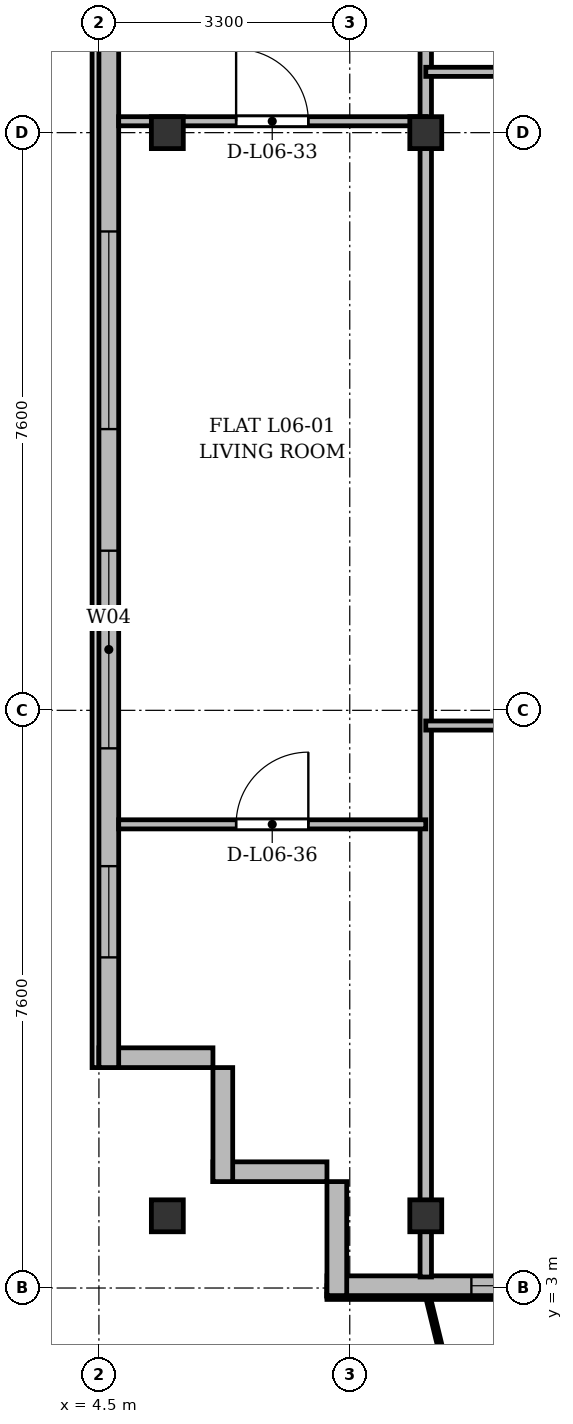
"""IFC4 building model, lengths in metres.
Left out: names, types, materials, properties, quantities, classifications, styles, units other than length and angle.
Written with IfcOpenShell. Run it as: python <this file> out.ifc"""

import sys

from ifc_helpers import new_model, si_unit, direction, frame, frame_2d, origin, origin_2d, place, context, subcontext, project, spatial, rectangle, i_section, extrude, source, transform, mapped, element, fill, save


model = new_model("IFC4")
c1 = context("Model", 3, precision=1e-05, world=origin(), true_north=direction((0.0, 1.0)))
c2 = subcontext(c1, "Body", "Model", "MODEL_VIEW")
j1 = project(units=[si_unit("LENGTHUNIT", "METRE"), si_unit("PLANEANGLEUNIT", "RADIAN")], contexts=[c1])
p1 = place(None, origin())
s1 = spatial("IfcSite", under=j1, at=p1, CompositionType="ELEMENT")
p2 = place(p1, origin())
s2 = spatial("IfcBuilding", under=s1, at=p2, CompositionType="ELEMENT")
p3 = place(p2, frame((0.0, 0.0, 27.1)))
s3 = spatial("IfcBuildingStorey", under=s2, at=p3, CompositionType="ELEMENT", Elevation=27.1)
m1 = source(origin(), c2, "Body", "SweptSolid", [
    extrude(i_section(OverallWidth=0.42, OverallDepth=0.42, WebThickness=0.026, FlangeThickness=0.04, at=origin_2d()), origin(), (0.0, 0.0, 1.0), 3.6),
])
for number, where, z_axis, x_axis in (
    (1, (5.4, 3.95, 0.0), (0.0, 0.0, 1.0), (1.0, 0.0, 0.0)),
    (2, (5.4, 18.2, 0.0), (0.0, 0.0, 1.0), (1.0, 0.0, 0.0)),
    (3, (8.8, 3.95, 0.0), (0.0, 0.0, 1.0), (1.0, 0.0, 0.0)),
    (4, (8.8, 18.2, 0.0), (0.0, 0.0, 1.0), (1.0, 0.0, 0.0)),
):
    element("IfcColumn", number, at=place(p3, frame(where, z_axis=z_axis, x_axis=x_axis)), inside=s3, PredefinedType="COLUMN", context=c2, shape_type="MappedRepresentation", body=[
        mapped(m1, transform((0.0, 0.0, 0.0), x_axis=(1.0, 0.0, 0.0), y_axis=(0.0, 1.0, 0.0), z_axis=(0.0, 0.0, 1.0), scale=1.0)),
    ])
for number, where, z_axis, x_axis in (
    (5, (7.5, 4.53, 0.0), (0.0, 0.0, 1.0), (-1.0, 0.0, 0.0)),
    (6, (6.13, 4.4, 0.0), (0.0, 0.0, 1.0), (0.0, 1.0, 0.0)),
):
    element("IfcWall", number, at=place(p3, frame(where, z_axis=z_axis, x_axis=x_axis)), inside=s3, PredefinedType="SOLIDWALL", context=c2, shape_type="SweptSolid", body=[
        extrude(rectangle(XDim=1.5, YDim=0.26, at=frame_2d((0.75, 0.0))), origin(), (0.0, 0.0, 1.0), 3.34),
    ])
p4 = place(p3, frame((6.0, 6.03, 0.0), z_axis=(0.0, 0.0, 1.0), x_axis=(-1.0, 0.0, 0.0)))
e7 = element("IfcWall", 7, at=p4, inside=s3, PredefinedType="SOLIDWALL", context=c2, shape_type="SweptSolid", body=[
    extrude(rectangle(XDim=1.5, YDim=0.26, at=frame_2d((0.75, 0.0))), origin(), (0.0, 0.0, 1.0), 2.752),
])
p5 = place(p3, frame((4.63, 5.9, 0.0), z_axis=(0.0, 0.0, 1.0), x_axis=(0.0, 1.0, 0.0)))
e8 = element("IfcWall", 8, at=p5, inside=s3, PredefinedType="SOLIDWALL", context=c2, shape_type="SweptSolid", body=[
    extrude(rectangle(XDim=39.6, YDim=0.26, at=frame_2d((19.8, 0.0))), origin(), (0.0, 0.0, 1.0), 3.34),
])
p6 = place(p5, frame((1.45, 0.0, 0.92)))
e9 = element("IfcOpeningElement", 9, at=p6, cuts=e8, PredefinedType="OPENING", context=c2, shape_type="SweptSolid", body=[
    extrude(rectangle(XDim=1.2, YDim=1.65, at=frame_2d((0.6, 0.825))), frame((0.0, 0.14, 0.0), z_axis=(0.0, -1.0, 0.0), x_axis=(1.0, 0.0, 0.0)), (0.0, 0.0, 1.0), 0.28),
])
p7 = place(p5, frame((4.2, 0.0, 0.92)))
e10 = element("IfcOpeningElement", 10, at=p7, cuts=e8, PredefinedType="OPENING", context=c2, shape_type="SweptSolid", body=[
    extrude(rectangle(XDim=2.6, YDim=1.9, at=frame_2d((1.3, 0.95))), frame((0.0, 0.14, 0.0), z_axis=(0.0, -1.0, 0.0), x_axis=(1.0, 0.0, 0.0)), (0.0, 0.0, 1.0), 0.28),
])
p8 = place(p5, frame((8.4, 0.0, 0.92)))
e11 = element("IfcOpeningElement", 11, at=p8, cuts=e8, PredefinedType="OPENING", context=c2, shape_type="SweptSolid", body=[
    extrude(rectangle(XDim=2.6, YDim=1.9, at=frame_2d((1.3, 0.95))), frame((0.0, 0.14, 0.0), z_axis=(0.0, -1.0, 0.0), x_axis=(1.0, 0.0, 0.0)), (0.0, 0.0, 1.0), 0.28),
])
p9 = place(p5, frame((33.9, 0.0, 0.92)))
e12 = element("IfcOpeningElement", 12, at=p9, cuts=e8, PredefinedType="OPENING", context=c2, shape_type="SweptSolid", body=[
    extrude(rectangle(XDim=1.2, YDim=1.65, at=frame_2d((0.6, 0.825))), frame((0.0, 0.14, 0.0), z_axis=(0.0, -1.0, 0.0), x_axis=(1.0, 0.0, 0.0)), (0.0, 0.0, 1.0), 0.28),
])
p10 = place(p5, frame((37.25, 0.0, 0.92)))
e13 = element("IfcOpeningElement", 13, at=p10, cuts=e8, PredefinedType="OPENING", context=c2, shape_type="SweptSolid", body=[
    extrude(rectangle(XDim=1.2, YDim=1.65, at=frame_2d((0.6, 0.825))), frame((0.0, 0.14, 0.0), z_axis=(0.0, -1.0, 0.0), x_axis=(1.0, 0.0, 0.0)), (0.0, 0.0, 1.0), 0.28),
])
p11 = place(p3, frame((66.9, 3.03, 0.0), z_axis=(0.0, 0.0, 1.0), x_axis=(-1.0, 0.0, 0.0)))
e14 = element("IfcWall", 14, at=p11, inside=s3, PredefinedType="SOLIDWALL", context=c2, shape_type="SweptSolid", body=[
    extrude(rectangle(XDim=59.4, YDim=0.26, at=frame_2d((29.7, 0.0))), origin(), (0.0, 0.0, 1.0), 3.34),
])
p12 = place(p11, frame((3.95, 0.0, 0.9)))
e15 = element("IfcOpeningElement", 15, at=p12, cuts=e14, PredefinedType="OPENING", context=c2, shape_type="SweptSolid", body=[
    extrude(rectangle(XDim=1.5, YDim=1.75, at=frame_2d((0.75, 0.875))), frame((0.0, 0.14, 0.0), z_axis=(0.0, -1.0, 0.0), x_axis=(1.0, 0.0, 0.0)), (0.0, 0.0, 1.0), 0.28),
])
p13 = place(p11, frame((9.05, 0.0, 0.9)))
e16 = element("IfcOpeningElement", 16, at=p13, cuts=e14, PredefinedType="OPENING", context=c2, shape_type="SweptSolid", body=[
    extrude(rectangle(XDim=2.0, YDim=1.95, at=frame_2d((1.0, 0.975))), frame((0.0, 0.14, 0.0), z_axis=(0.0, -1.0, 0.0), x_axis=(1.0, 0.0, 0.0)), (0.0, 0.0, 1.0), 0.28),
])
p14 = place(p11, frame((13.125, 0.0, 0.9)))
e17 = element("IfcOpeningElement", 17, at=p14, cuts=e14, PredefinedType="OPENING", context=c2, shape_type="SweptSolid", body=[
    extrude(rectangle(XDim=1.65, YDim=1.85, at=frame_2d((0.825, 0.925))), frame((0.0, 0.14, 0.0), z_axis=(0.0, -1.0, 0.0), x_axis=(1.0, 0.0, 0.0)), (0.0, 0.0, 1.0), 0.28),
])
p15 = place(p11, frame((17.007, 0.0, 0.0)))
e18 = element("IfcOpeningElement", 18, at=p15, cuts=e14, PredefinedType="OPENING", context=c2, shape_type="SweptSolid", body=[
    extrude(rectangle(XDim=1.2, YDim=2.2, at=frame_2d((0.6, 1.1))), frame((0.0, 0.14, 0.0), z_axis=(0.0, -1.0, 0.0), x_axis=(1.0, 0.0, 0.0)), (0.0, 0.0, 1.0), 0.28),
])
p16 = place(p11, frame((20.2, 0.0, 0.9)))
e19 = element("IfcOpeningElement", 19, at=p16, cuts=e14, PredefinedType="OPENING", context=c2, shape_type="SweptSolid", body=[
    extrude(rectangle(XDim=2.2, YDim=1.8, at=frame_2d((1.1, 0.9))), frame((0.0, 0.14, 0.0), z_axis=(0.0, -1.0, 0.0), x_axis=(1.0, 0.0, 0.0)), (0.0, 0.0, 1.0), 0.28),
])
p17 = place(p11, frame((24.0, 0.0, 0.9)))
e20 = element("IfcOpeningElement", 20, at=p17, cuts=e14, PredefinedType="OPENING", context=c2, shape_type="SweptSolid", body=[
    extrude(rectangle(XDim=1.5, YDim=1.75, at=frame_2d((0.75, 0.875))), frame((0.0, 0.14, 0.0), z_axis=(0.0, -1.0, 0.0), x_axis=(1.0, 0.0, 0.0)), (0.0, 0.0, 1.0), 0.28),
])
p18 = place(p11, frame((27.05, 0.0, 0.9)))
e21 = element("IfcOpeningElement", 21, at=p18, cuts=e14, PredefinedType="OPENING", context=c2, shape_type="SweptSolid", body=[
    extrude(rectangle(XDim=2.0, YDim=1.95, at=frame_2d((1.0, 0.975))), frame((0.0, 0.14, 0.0), z_axis=(0.0, -1.0, 0.0), x_axis=(1.0, 0.0, 0.0)), (0.0, 0.0, 1.0), 0.28),
])
p19 = place(p11, frame((32.175, 0.0, 0.9)))
e22 = element("IfcOpeningElement", 22, at=p19, cuts=e14, PredefinedType="OPENING", context=c2, shape_type="SweptSolid", body=[
    extrude(rectangle(XDim=1.65, YDim=1.85, at=frame_2d((0.825, 0.925))), frame((0.0, 0.14, 0.0), z_axis=(0.0, -1.0, 0.0), x_axis=(1.0, 0.0, 0.0)), (0.0, 0.0, 1.0), 0.28),
])
p20 = place(p11, frame((36.6, 0.0, 0.9)))
e23 = element("IfcOpeningElement", 23, at=p20, cuts=e14, PredefinedType="OPENING", context=c2, shape_type="SweptSolid", body=[
    extrude(rectangle(XDim=1.8, YDim=1.8, at=frame_2d((0.9, 0.9))), frame((0.0, 0.14, 0.0), z_axis=(0.0, -1.0, 0.0), x_axis=(1.0, 0.0, 0.0)), (0.0, 0.0, 1.0), 0.28),
])
p21 = place(p11, frame((39.15, 0.0, 0.9)))
e24 = element("IfcOpeningElement", 24, at=p21, cuts=e14, PredefinedType="OPENING", context=c2, shape_type="SweptSolid", body=[
    extrude(rectangle(XDim=1.5, YDim=1.75, at=frame_2d((0.75, 0.875))), frame((0.0, 0.14, 0.0), z_axis=(0.0, -1.0, 0.0), x_axis=(1.0, 0.0, 0.0)), (0.0, 0.0, 1.0), 0.28),
])
p22 = place(p11, frame((41.55, 0.0, 0.9)))
e25 = element("IfcOpeningElement", 25, at=p22, cuts=e14, PredefinedType="OPENING", context=c2, shape_type="SweptSolid", body=[
    extrude(rectangle(XDim=1.5, YDim=1.75, at=frame_2d((0.75, 0.875))), frame((0.0, 0.14, 0.0), z_axis=(0.0, -1.0, 0.0), x_axis=(1.0, 0.0, 0.0)), (0.0, 0.0, 1.0), 0.28),
])
p23 = place(p11, frame((45.435, 0.0, 0.0)))
e26 = element("IfcOpeningElement", 26, at=p23, cuts=e14, PredefinedType="OPENING", context=c2, shape_type="SweptSolid", body=[
    extrude(rectangle(XDim=1.2, YDim=2.2, at=frame_2d((0.6, 1.1))), frame((0.0, 0.14, 0.0), z_axis=(0.0, -1.0, 0.0), x_axis=(1.0, 0.0, 0.0)), (0.0, 0.0, 1.0), 0.28),
])
p24 = place(p11, frame((48.525, 0.0, 0.9)))
e27 = element("IfcOpeningElement", 27, at=p24, cuts=e14, PredefinedType="OPENING", context=c2, shape_type="SweptSolid", body=[
    extrude(rectangle(XDim=1.65, YDim=1.85, at=frame_2d((0.825, 0.925))), frame((0.0, 0.14, 0.0), z_axis=(0.0, -1.0, 0.0), x_axis=(1.0, 0.0, 0.0)), (0.0, 0.0, 1.0), 0.28),
])
p25 = place(p11, frame((52.1, 0.0, 0.9)))
e28 = element("IfcOpeningElement", 28, at=p25, cuts=e14, PredefinedType="OPENING", context=c2, shape_type="SweptSolid", body=[
    extrude(rectangle(XDim=1.8, YDim=1.8, at=frame_2d((0.9, 0.9))), frame((0.0, 0.14, 0.0), z_axis=(0.0, -1.0, 0.0), x_axis=(1.0, 0.0, 0.0)), (0.0, 0.0, 1.0), 0.28),
])
p26 = place(p11, frame((55.3, 0.0, 0.9)))
e29 = element("IfcOpeningElement", 29, at=p26, cuts=e14, PredefinedType="OPENING", context=c2, shape_type="SweptSolid", body=[
    extrude(rectangle(XDim=2.2, YDim=1.8, at=frame_2d((1.1, 0.9))), frame((0.0, 0.14, 0.0), z_axis=(0.0, -1.0, 0.0), x_axis=(1.0, 0.0, 0.0)), (0.0, 0.0, 1.0), 0.28),
])
p27 = place(p3, frame((7.63, 2.9, 0.0), z_axis=(0.0, 0.0, 1.0), x_axis=(0.0, 1.0, 0.0)))
e30 = element("IfcWall", 30, at=p27, inside=s3, PredefinedType="SOLIDWALL", context=c2, shape_type="SweptSolid", body=[
    extrude(rectangle(XDim=1.5, YDim=0.26, at=frame_2d((0.75, 0.0))), origin(), (0.0, 0.0, 1.0), 2.69),
])
p28 = place(p3, frame((8.8, 3.145, 0.0), z_axis=(0.0, 0.0, 1.0), x_axis=(0.0, 1.0, 0.0)))
e31 = element("IfcWall", 31, at=p28, inside=s3, PredefinedType="PARTITIONING", context=c2, shape_type="SweptSolid", body=[
    extrude(rectangle(XDim=24.455, YDim=0.15, at=frame_2d((12.228, 0.0))), origin(), (0.0, 0.0, 1.0), 2.752),
])
p29 = place(p3, frame((4.76, 18.35, 0.0), z_axis=(0.0, 0.0, 1.0), x_axis=(1.0, 0.0, 0.0)))
e32 = element("IfcWall", 32, at=p29, inside=s3, PredefinedType="PARTITIONING", context=c2, shape_type="SweptSolid", body=[
    extrude(rectangle(XDim=4.04, YDim=0.12, at=frame_2d((2.02, 0.0))), origin(), (0.0, 0.0, 1.0), 2.69),
])
p30 = place(p29, frame((1.545, 0.0, 0.0)))
e33 = element("IfcOpeningElement", 33, at=p30, cuts=e32, PredefinedType="OPENING", context=c2, shape_type="SweptSolid", body=[
    extrude(rectangle(XDim=0.95, YDim=2.15, at=frame_2d((0.475, 1.075))), frame((0.0, 0.07, 0.0), z_axis=(0.0, -1.0, 0.0), x_axis=(1.0, 0.0, 0.0)), (0.0, 0.0, 1.0), 0.14),
])
p31 = place(p3, frame((4.76, 9.1, 0.0), z_axis=(0.0, 0.0, 1.0), x_axis=(1.0, 0.0, 0.0)))
e34 = element("IfcWall", 34, at=p31, inside=s3, PredefinedType="PARTITIONING", context=c2, shape_type="SweptSolid", body=[
    extrude(rectangle(XDim=4.04, YDim=0.12, at=frame_2d((2.02, 0.0))), origin(), (0.0, 0.0, 1.0), 2.752),
])
p32 = place(p31, frame((1.545, 0.0, 0.0)))
e35 = element("IfcOpeningElement", 35, at=p32, cuts=e34, PredefinedType="OPENING", context=c2, shape_type="SweptSolid", body=[
    extrude(rectangle(XDim=0.95, YDim=2.15, at=frame_2d((0.475, 1.075))), frame((0.0, 0.07, 0.0), z_axis=(0.0, -1.0, 0.0), x_axis=(1.0, 0.0, 0.0)), (0.0, 0.0, 1.0), 0.14),
])
p33 = place(p3, frame((8.8, 19.0, 0.0), z_axis=(0.0, 0.0, 1.0), x_axis=(1.0, 0.0, 0.0)))
e36 = element("IfcWall", 36, at=p33, inside=s3, PredefinedType="PARTITIONING", context=c2, shape_type="SweptSolid", body=[
    extrude(rectangle(XDim=6.8, YDim=0.12, at=frame_2d((3.4, 0.0))), origin(), (0.0, 0.0, 1.0), 2.752),
])
p34 = place(p33, frame((2.925, 0.0, 0.0)))
e37 = element("IfcOpeningElement", 37, at=p34, cuts=e36, PredefinedType="OPENING", context=c2, shape_type="SweptSolid", body=[
    extrude(rectangle(XDim=0.95, YDim=2.15, at=frame_2d((0.475, 1.075))), frame((0.0, 0.07, 0.0), z_axis=(0.0, -1.0, 0.0), x_axis=(1.0, 0.0, 0.0)), (0.0, 0.0, 1.0), 0.14),
])
p35 = place(p3, frame((8.8, 10.4, 0.0), z_axis=(0.0, 0.0, 1.0), x_axis=(1.0, 0.0, 0.0)))
e38 = element("IfcWall", 38, at=p35, inside=s3, PredefinedType="PARTITIONING", context=c2, shape_type="SweptSolid", body=[
    extrude(rectangle(XDim=3.4, YDim=0.12, at=frame_2d((1.7, 0.0))), origin(), (0.0, 0.0, 1.0), 2.752),
])
p36 = place(p35, frame((1.131, 0.0, 0.0)))
e39 = element("IfcOpeningElement", 39, at=p36, cuts=e38, PredefinedType="OPENING", context=c2, shape_type="SweptSolid", body=[
    extrude(rectangle(XDim=0.95, YDim=2.15, at=frame_2d((0.475, 1.075))), frame((0.0, 0.07, 0.0), z_axis=(0.0, -1.0, 0.0), x_axis=(1.0, 0.0, 0.0)), (0.0, 0.0, 1.0), 0.14),
])
m2 = source(origin(), c2, "Body", "SweptSolid", [
    extrude(rectangle(XDim=1.2, YDim=1.65, at=frame_2d((0.6, 0.825))), frame((0.0, 0.03, 0.0), z_axis=(0.0, -1.0, 0.0), x_axis=(1.0, 0.0, 0.0)), (0.0, 0.0, 1.0), 0.06),
])
p37 = place(p6, origin())
e40 = element("IfcWindow", 40, at=p37, inside=s3, PartitioningType="SINGLE_PANEL", PredefinedType="WINDOW", context=c2, shape_type="MappedRepresentation", body=[
    mapped(m2, transform((0.0, 0.0, 0.0), x_axis=(1.0, 0.0, 0.0), y_axis=(0.0, 1.0, 0.0), z_axis=(0.0, 0.0, 1.0), scale=1.0)),
])
fill(e9, e40)
m3 = source(origin(), c2, "Body", "SweptSolid", [
    extrude(rectangle(XDim=2.6, YDim=1.9, at=frame_2d((1.3, 0.95))), frame((0.0, 0.03, 0.0), z_axis=(0.0, -1.0, 0.0), x_axis=(1.0, 0.0, 0.0)), (0.0, 0.0, 1.0), 0.06),
])
p38 = place(p7, origin())
e41 = element("IfcWindow", 41, at=p38, inside=s3, PartitioningType="SINGLE_PANEL", PredefinedType="WINDOW", context=c2, shape_type="MappedRepresentation", body=[
    mapped(m3, transform((0.0, 0.0, 0.0), x_axis=(1.0, 0.0, 0.0), y_axis=(0.0, 1.0, 0.0), z_axis=(0.0, 0.0, 1.0), scale=1.0)),
])
fill(e10, e41)
p39 = place(p8, origin())
e42 = element("IfcWindow", 42, at=p39, inside=s3, PartitioningType="SINGLE_PANEL", PredefinedType="WINDOW", context=c2, shape_type="MappedRepresentation", body=[
    mapped(m3, transform((0.0, 0.0, 0.0), x_axis=(1.0, 0.0, 0.0), y_axis=(0.0, 1.0, 0.0), z_axis=(0.0, 0.0, 1.0), scale=1.0)),
])
fill(e11, e42)
m4 = source(origin(), c2, "Body", "SweptSolid", [
    extrude(rectangle(XDim=2.2, YDim=1.8, at=frame_2d((1.1, 0.9))), frame((0.0, 0.03, 0.0), z_axis=(0.0, -1.0, 0.0), x_axis=(1.0, 0.0, 0.0)), (0.0, 0.0, 1.0), 0.06),
])
p40 = place(p26, origin())
e43 = element("IfcWindow", 43, at=p40, inside=s3, PartitioningType="SINGLE_PANEL", PredefinedType="WINDOW", context=c2, shape_type="MappedRepresentation", body=[
    mapped(m4, transform((0.0, 0.0, 0.0), x_axis=(1.0, 0.0, 0.0), y_axis=(0.0, 1.0, 0.0), z_axis=(0.0, 0.0, 1.0), scale=1.0)),
])
fill(e29, e43)
m5 = source(origin(), c2, "Body", "SweptSolid", [
    extrude(rectangle(XDim=0.95, YDim=2.15, at=frame_2d((0.475, 1.075))), frame((0.0, 0.025, 0.0), z_axis=(0.0, -1.0, 0.0), x_axis=(1.0, 0.0, 0.0)), (0.0, 0.0, 1.0), 0.05),
])
p41 = place(p30, origin())
e44 = element("IfcDoor", 44, at=p41, inside=s3, OperationType="SINGLE_SWING_LEFT", PredefinedType="DOOR", context=c2, shape_type="MappedRepresentation", body=[
    mapped(m5, transform((0.0, 0.0, 0.0), x_axis=(1.0, 0.0, 0.0), y_axis=(0.0, 1.0, 0.0), z_axis=(0.0, 0.0, 1.0), scale=1.0)),
])
fill(e33, e44)
p42 = place(p32, origin())
e45 = element("IfcDoor", 45, at=p42, inside=s3, OperationType="SINGLE_SWING_RIGHT", PredefinedType="DOOR", context=c2, shape_type="MappedRepresentation", body=[
    mapped(m5, transform((0.0, 0.0, 0.0), x_axis=(1.0, 0.0, 0.0), y_axis=(0.0, 1.0, 0.0), z_axis=(0.0, 0.0, 1.0), scale=1.0)),
])
fill(e35, e45)
save(model, sys.argv[1])
